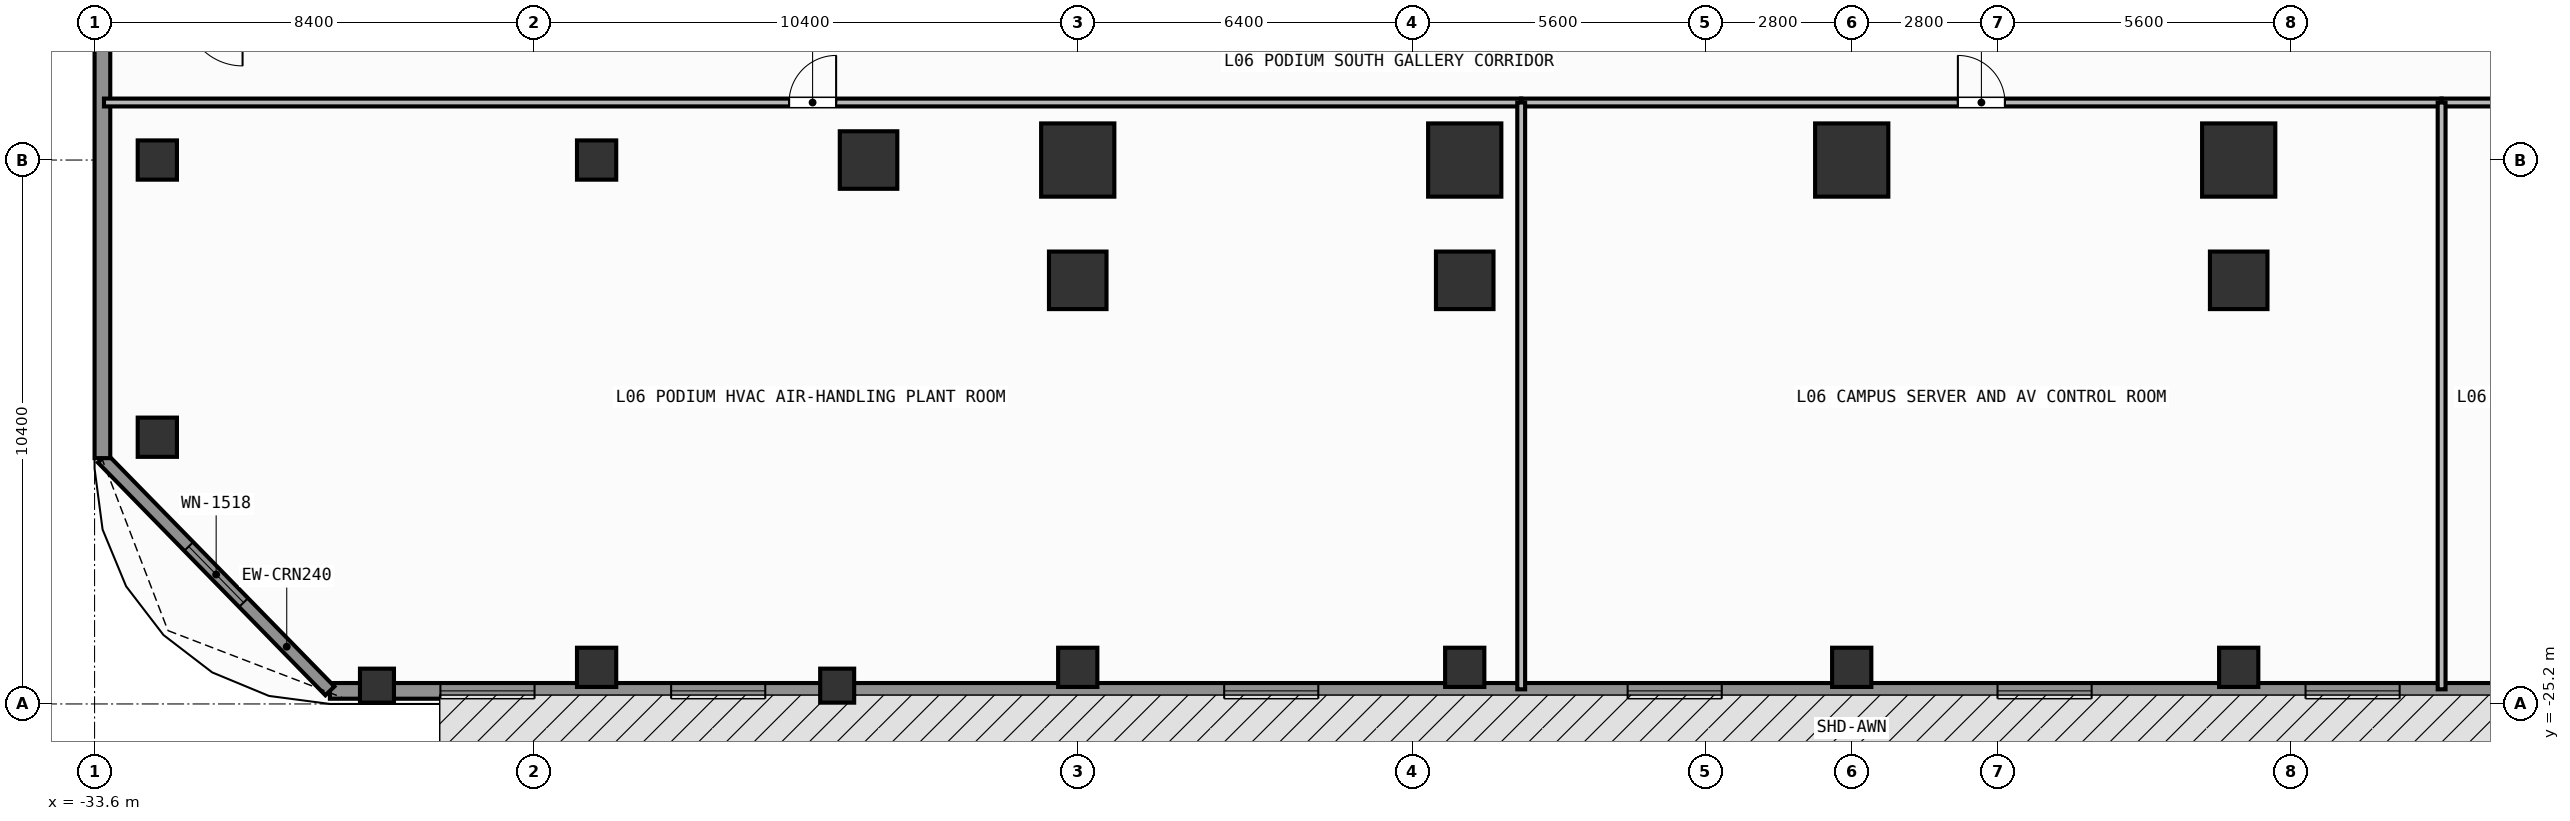
"""IFC4 building model, lengths in metres.
Left out: names, types, materials, properties, quantities, classifications, styles, units other than length and angle.
Written with IfcOpenShell. Run it as: python <this file> out.ifc"""

import sys

from ifc_helpers import new_model, si_unit, direction, frame, frame_2d, origin, origin_2d, place, context, subcontext, project, spatial, rectangle, extrude, element, fill, save


model = new_model("IFC4")
c1 = context("Model", 3, precision=1e-05, world=origin(), true_north=direction((0.0, 1.0)))
c2 = subcontext(c1, "Body", "Model", "MODEL_VIEW")
j1 = project(units=[si_unit("LENGTHUNIT", "METRE"), si_unit("PLANEANGLEUNIT", "RADIAN")], contexts=[c1])
p1 = place(None, origin())
s1 = spatial("IfcSite", under=j1, at=p1, CompositionType="ELEMENT")
p2 = place(p1, origin())
s2 = spatial("IfcBuilding", under=s1, at=p2, CompositionType="ELEMENT")
p3 = place(p2, frame((0.0, 0.0, 21.6)))
s3 = spatial("IfcBuildingStorey", under=s2, at=p3, CompositionType="ELEMENT", Elevation=21.6)
for number, where, z_axis, x_axis in (
    (1, (-14.8, -14.8, 0.0), (0.0, 0.0, 1.0), (1.0, 0.0, 0.0)),
    (2, (-7.4, -14.8, 0.0), (0.0, 0.0, 1.0), (1.0, 0.0, 0.0)),
    (3, (0.0, -14.8, 0.0), (0.0, 0.0, 1.0), (1.0, 0.0, 0.0)),
    (4, (7.4, -14.8, 0.0), (0.0, 0.0, 1.0), (1.0, 0.0, 0.0)),
):
    element("IfcColumn", number, at=place(p3, frame(where, z_axis=z_axis, x_axis=x_axis)), inside=s3, PredefinedType="COLUMN", context=c2, shape_type="SweptSolid", body=[
        extrude(rectangle(XDim=1.4, YDim=1.4, at=origin_2d()), origin(), (0.0, 0.0, 1.0), 4.8),
    ])
for number, where, z_axis, x_axis in (
    (5, (-18.8, -14.8, 0.0), (0.0, 0.0, 1.0), (1.0, 0.0, 0.0)),
    (6, (-14.8, -17.1, 0.0), (0.0, 0.0, 1.0), (1.0, 0.0, 0.0)),
    (7, (-7.4, -17.1, 0.0), (0.0, 0.0, 1.0), (1.0, 0.0, 0.0)),
    (8, (7.4, -17.1, 0.0), (0.0, 0.0, 1.0), (1.0, 0.0, 0.0)),
):
    element("IfcColumn", number, at=place(p3, frame(where, z_axis=z_axis, x_axis=x_axis)), inside=s3, PredefinedType="COLUMN", context=c2, shape_type="SweptSolid", body=[
        extrude(rectangle(XDim=1.1, YDim=1.1, at=origin_2d()), origin(), (0.0, 0.0, 1.0), 4.8),
    ])
for number, where, z_axis, x_axis in (
    (9, (-32.4, -14.8, 0.0), (0.0, 0.0, 1.0), (1.0, 0.0, 0.0)),
    (10, (-24.0, -24.5, 0.0), (0.0, 0.0, 1.0), (1.0, 0.0, 0.0)),
    (11, (-24.0, -14.8, 0.0), (0.0, 0.0, 1.0), (1.0, 0.0, 0.0)),
    (12, (-14.8, -24.5, 0.0), (0.0, 0.0, 1.0), (1.0, 0.0, 0.0)),
    (13, (-7.4, -24.5, 0.0), (0.0, 0.0, 1.0), (1.0, 0.0, 0.0)),
    (14, (0.0, -24.5, 0.0), (0.0, 0.0, 1.0), (1.0, 0.0, 0.0)),
    (15, (7.4, -24.5, 0.0), (0.0, 0.0, 1.0), (1.0, 0.0, 0.0)),
    (16, (-32.4, -20.1, 0.0), (0.0, 0.0, 1.0), (1.0, 0.0, 0.0)),
):
    element("IfcColumn", number, at=place(p3, frame(where, z_axis=z_axis, x_axis=x_axis)), inside=s3, PredefinedType="COLUMN", context=c2, shape_type="SweptSolid", body=[
        extrude(rectangle(XDim=0.75, YDim=0.75, at=origin_2d()), origin(), (0.0, 0.0, 1.0), 4.8),
    ])
for number, where, z_axis, x_axis in (
    (17, (-28.2, -24.85, 0.0), (0.0, 0.0, 1.0), (1.0, 0.0, 0.0)),
    (18, (-19.4, -24.85, 0.0), (0.0, 0.0, 1.0), (1.0, 0.0, 0.0)),
):
    element("IfcColumn", number, at=place(p3, frame(where, z_axis=z_axis, x_axis=x_axis)), inside=s3, PredefinedType="PILASTER", context=c2, shape_type="SweptSolid", body=[
        extrude(rectangle(XDim=0.65, YDim=0.65, at=origin_2d()), origin(), (0.0, 0.0, 1.0), 4.8),
    ])
p4 = place(p3, frame((29.1, -24.95, 0.0), z_axis=(0.0, 0.0, 1.0), x_axis=(-1.0, 0.0, 0.0)))
e19 = element("IfcWall", 19, at=p4, inside=s3, PredefinedType="SOLIDWALL", context=c2, shape_type="SweptSolid", body=[
    extrude(rectangle(XDim=58.2, YDim=0.3, at=frame_2d((29.1, 0.0))), origin(), (0.0, 0.0, 1.0), 4.48),
])
p5 = place(p4, frame((54.287, 0.0, 0.85)))
e20 = element("IfcOpeningElement", 20, at=p5, cuts=e19, PredefinedType="OPENING", context=c2, shape_type="SweptSolid", body=[
    extrude(rectangle(XDim=1.8, YDim=2.0, at=frame_2d((0.9, 1.0))), frame((0.0, 0.16, 0.0), z_axis=(0.0, -1.0, 0.0), x_axis=(1.0, 0.0, 0.0)), (0.0, 0.0, 1.0), 0.32),
])
p6 = place(p4, frame((49.875, 0.0, 0.85)))
e21 = element("IfcOpeningElement", 21, at=p6, cuts=e19, PredefinedType="OPENING", context=c2, shape_type="SweptSolid", body=[
    extrude(rectangle(XDim=1.8, YDim=2.0, at=frame_2d((0.9, 1.0))), frame((0.0, 0.16, 0.0), z_axis=(0.0, -1.0, 0.0), x_axis=(1.0, 0.0, 0.0)), (0.0, 0.0, 1.0), 0.32),
])
p7 = place(p4, frame((39.3, 0.0, 0.85)))
e22 = element("IfcOpeningElement", 22, at=p7, cuts=e19, PredefinedType="OPENING", context=c2, shape_type="SweptSolid", body=[
    extrude(rectangle(XDim=1.8, YDim=2.0, at=frame_2d((0.9, 1.0))), frame((0.0, 0.16, 0.0), z_axis=(0.0, -1.0, 0.0), x_axis=(1.0, 0.0, 0.0)), (0.0, 0.0, 1.0), 0.32),
])
p8 = place(p4, frame((31.585, 0.0, 0.85)))
e23 = element("IfcOpeningElement", 23, at=p8, cuts=e19, PredefinedType="OPENING", context=c2, shape_type="SweptSolid", body=[
    extrude(rectangle(XDim=1.8, YDim=2.0, at=frame_2d((0.9, 1.0))), frame((0.0, 0.16, 0.0), z_axis=(0.0, -1.0, 0.0), x_axis=(1.0, 0.0, 0.0)), (0.0, 0.0, 1.0), 0.32),
])
p9 = place(p4, frame((24.512, 0.0, 0.85)))
e24 = element("IfcOpeningElement", 24, at=p9, cuts=e19, PredefinedType="OPENING", context=c2, shape_type="SweptSolid", body=[
    extrude(rectangle(XDim=1.8, YDim=2.0, at=frame_2d((0.9, 1.0))), frame((0.0, 0.16, 0.0), z_axis=(0.0, -1.0, 0.0), x_axis=(1.0, 0.0, 0.0)), (0.0, 0.0, 1.0), 0.32),
])
p10 = place(p4, frame((18.622, 0.0, 0.85)))
e25 = element("IfcOpeningElement", 25, at=p10, cuts=e19, PredefinedType="OPENING", context=c2, shape_type="SweptSolid", body=[
    extrude(rectangle(XDim=1.8, YDim=2.0, at=frame_2d((0.9, 1.0))), frame((0.0, 0.16, 0.0), z_axis=(0.0, -1.0, 0.0), x_axis=(1.0, 0.0, 0.0)), (0.0, 0.0, 1.0), 0.32),
])
p11 = place(p4, frame((2.113, 0.0, 0.85)))
e26 = element("IfcOpeningElement", 26, at=p11, cuts=e19, PredefinedType="OPENING", context=c2, shape_type="SweptSolid", body=[
    extrude(rectangle(XDim=1.8, YDim=2.0, at=frame_2d((0.9, 1.0))), frame((0.0, 0.16, 0.0), z_axis=(0.0, -1.0, 0.0), x_axis=(1.0, 0.0, 0.0)), (0.0, 0.0, 1.0), 0.32),
])
p12 = place(p3, frame((-29.1, -24.95, 0.0), z_axis=(0.0, 0.0, 1.0), x_axis=(-0.69901822973, 0.715103848756, 0.0)))
e27 = element("IfcWall", 27, at=p12, inside=s3, PredefinedType="SOLIDWALL", context=c2, shape_type="SweptSolid", body=[
    extrude(rectangle(XDim=6.223, YDim=0.24, at=frame_2d((3.111, 0.0))), origin(), (0.0, 0.0, 1.0), 4.48),
])
p13 = place(p12, frame((2.362, 0.0, 0.85)))
e28 = element("IfcOpeningElement", 28, at=p13, cuts=e27, PredefinedType="OPENING", context=c2, shape_type="SweptSolid", body=[
    extrude(rectangle(XDim=1.5, YDim=1.85, at=frame_2d((0.75, 0.925))), frame((0.0, 0.13, 0.0), z_axis=(0.0, -1.0, 0.0), x_axis=(1.0, 0.0, 0.0)), (0.0, 0.0, 1.0), 0.26),
])
p14 = place(p3, frame((-33.45, -20.5, 0.0), z_axis=(0.0, 0.0, 1.0), x_axis=(0.0, 1.0, 0.0)))
e29 = element("IfcWall", 29, at=p14, inside=s3, PredefinedType="SOLIDWALL", context=c2, shape_type="SweptSolid", body=[
    extrude(rectangle(XDim=14.09, YDim=0.3, at=frame_2d((7.045, 0.0))), origin(), (0.0, 0.0, 1.0), 4.48),
])
p15 = place(p3, frame((-33.42, -13.7, 0.0), z_axis=(0.0, 0.0, 1.0), x_axis=(1.0, 0.0, 0.0)))
e30 = element("IfcWall", 30, at=p15, inside=s3, PredefinedType="PARTITIONING", context=c2, shape_type="SweptSolid", body=[
    extrude(rectangle(XDim=27.1, YDim=0.15, at=frame_2d((13.55, 0.0))), origin(), (0.0, 0.0, 1.0), 4.48),
])
p16 = place(p15, frame((13.1, 0.0, 0.0)))
e31 = element("IfcOpeningElement", 31, at=p16, cuts=e30, PredefinedType="OPENING", context=c2, shape_type="SweptSolid", body=[
    extrude(rectangle(XDim=0.9, YDim=2.1, at=frame_2d((0.45, 1.05))), frame((0.0, 0.085, 0.0), z_axis=(0.0, -1.0, 0.0), x_axis=(1.0, 0.0, 0.0)), (0.0, 0.0, 1.0), 0.17),
])
p17 = place(p3, frame((-6.32, -13.7, 0.0), z_axis=(0.0, 0.0, 1.0), x_axis=(1.0, 0.0, 0.0)))
e32 = element("IfcWall", 32, at=p17, inside=s3, PredefinedType="PARTITIONING", context=c2, shape_type="SweptSolid", body=[
    extrude(rectangle(XDim=17.6, YDim=0.15, at=frame_2d((8.8, 0.0))), origin(), (0.0, 0.0, 1.0), 4.48),
])
p18 = place(p17, frame((8.35, 0.0, 0.0)))
e33 = element("IfcOpeningElement", 33, at=p18, cuts=e32, PredefinedType="OPENING", context=c2, shape_type="SweptSolid", body=[
    extrude(rectangle(XDim=0.9, YDim=2.1, at=frame_2d((0.45, 1.05))), frame((0.0, 0.085, 0.0), z_axis=(0.0, -1.0, 0.0), x_axis=(1.0, 0.0, 0.0)), (0.0, 0.0, 1.0), 0.17),
])
p19 = place(p3, frame((11.28, -13.7, 0.0), z_axis=(0.0, 0.0, 1.0), x_axis=(1.0, 0.0, 0.0)))
e34 = element("IfcWall", 34, at=p19, inside=s3, PredefinedType="PARTITIONING", context=c2, shape_type="SweptSolid", body=[
    extrude(rectangle(XDim=6.37, YDim=0.15, at=frame_2d((3.185, 0.0))), origin(), (0.0, 0.0, 1.0), 4.48),
])
p20 = place(p19, frame((1.774, 0.0, 0.0)))
e35 = element("IfcOpeningElement", 35, at=p20, cuts=e34, PredefinedType="OPENING", context=c2, shape_type="SweptSolid", body=[
    extrude(rectangle(XDim=0.85, YDim=2.1, at=frame_2d((0.425, 1.05))), frame((0.0, 0.085, 0.0), z_axis=(0.0, -1.0, 0.0), x_axis=(1.0, 0.0, 0.0)), (0.0, 0.0, 1.0), 0.17),
])
p21 = place(p3, frame((-6.32, -24.92, 0.0), z_axis=(0.0, 0.0, 1.0), x_axis=(0.0, 1.0, 0.0)))
e36 = element("IfcWall", 36, at=p21, inside=s3, PredefinedType="PARTITIONING", context=c2, shape_type="SweptSolid", body=[
    extrude(rectangle(XDim=11.22, YDim=0.15, at=frame_2d((5.61, 0.0))), origin(), (0.0, 0.0, 1.0), 4.48),
])
p22 = place(p3, frame((11.28, -24.92, 0.0), z_axis=(0.0, 0.0, 1.0), x_axis=(0.0, 1.0, 0.0)))
e37 = element("IfcWall", 37, at=p22, inside=s3, PredefinedType="PARTITIONING", context=c2, shape_type="SweptSolid", body=[
    extrude(rectangle(XDim=11.22, YDim=0.15, at=frame_2d((5.61, 0.0))), origin(), (0.0, 0.0, 1.0), 4.17),
])
p23 = place(p13, origin())
e38 = element("IfcWindow", 38, at=p23, inside=s3, PartitioningType="SINGLE_PANEL", PredefinedType="WINDOW", context=c2, shape_type="SweptSolid", body=[
    extrude(rectangle(XDim=1.5, YDim=1.85, at=frame_2d((0.75, 0.925))), frame((0.0, 0.03, 0.0), z_axis=(0.0, -1.0, 0.0), x_axis=(1.0, 0.0, 0.0)), (0.0, 0.0, 1.0), 0.06),
])
fill(e28, e38)
p24 = place(p5, origin())
e39 = element("IfcWindow", 39, at=p24, inside=s3, PartitioningType="SINGLE_PANEL", PredefinedType="WINDOW", context=c2, shape_type="SweptSolid", body=[
    extrude(rectangle(XDim=1.8, YDim=2.0, at=frame_2d((0.9, 1.0))), frame((0.0, 0.03, 0.0), z_axis=(0.0, -1.0, 0.0), x_axis=(1.0, 0.0, 0.0)), (0.0, 0.0, 1.0), 0.06),
])
fill(e20, e39)
p25 = place(p6, origin())
e40 = element("IfcWindow", 40, at=p25, inside=s3, PartitioningType="SINGLE_PANEL", PredefinedType="WINDOW", context=c2, shape_type="SweptSolid", body=[
    extrude(rectangle(XDim=1.8, YDim=2.0, at=frame_2d((0.9, 1.0))), frame((0.0, 0.03, 0.0), z_axis=(0.0, -1.0, 0.0), x_axis=(1.0, 0.0, 0.0)), (0.0, 0.0, 1.0), 0.06),
])
fill(e21, e40)
p26 = place(p7, origin())
e41 = element("IfcWindow", 41, at=p26, inside=s3, PartitioningType="SINGLE_PANEL", PredefinedType="WINDOW", context=c2, shape_type="SweptSolid", body=[
    extrude(rectangle(XDim=1.8, YDim=2.0, at=frame_2d((0.9, 1.0))), frame((0.0, 0.03, 0.0), z_axis=(0.0, -1.0, 0.0), x_axis=(1.0, 0.0, 0.0)), (0.0, 0.0, 1.0), 0.06),
])
fill(e22, e41)
p27 = place(p8, origin())
e42 = element("IfcWindow", 42, at=p27, inside=s3, PartitioningType="SINGLE_PANEL", PredefinedType="WINDOW", context=c2, shape_type="SweptSolid", body=[
    extrude(rectangle(XDim=1.8, YDim=2.0, at=frame_2d((0.9, 1.0))), frame((0.0, 0.03, 0.0), z_axis=(0.0, -1.0, 0.0), x_axis=(1.0, 0.0, 0.0)), (0.0, 0.0, 1.0), 0.06),
])
fill(e23, e42)
p28 = place(p9, origin())
e43 = element("IfcWindow", 43, at=p28, inside=s3, PartitioningType="SINGLE_PANEL", PredefinedType="WINDOW", context=c2, shape_type="SweptSolid", body=[
    extrude(rectangle(XDim=1.8, YDim=2.0, at=frame_2d((0.9, 1.0))), frame((0.0, 0.03, 0.0), z_axis=(0.0, -1.0, 0.0), x_axis=(1.0, 0.0, 0.0)), (0.0, 0.0, 1.0), 0.06),
])
fill(e24, e43)
p29 = place(p10, origin())
e44 = element("IfcWindow", 44, at=p29, inside=s3, PartitioningType="SINGLE_PANEL", PredefinedType="WINDOW", context=c2, shape_type="SweptSolid", body=[
    extrude(rectangle(XDim=1.8, YDim=2.0, at=frame_2d((0.9, 1.0))), frame((0.0, 0.03, 0.0), z_axis=(0.0, -1.0, 0.0), x_axis=(1.0, 0.0, 0.0)), (0.0, 0.0, 1.0), 0.06),
])
fill(e25, e44)
p30 = place(p16, origin())
e45 = element("IfcDoor", 45, at=p30, inside=s3, OperationType="SINGLE_SWING_RIGHT", PredefinedType="DOOR", context=c2, shape_type="SweptSolid", body=[
    extrude(rectangle(XDim=0.9, YDim=2.1, at=frame_2d((0.45, 1.05))), frame((0.0, 0.025, 0.0), z_axis=(0.0, -1.0, 0.0), x_axis=(1.0, 0.0, 0.0)), (0.0, 0.0, 1.0), 0.05),
])
fill(e31, e45)
p31 = place(p18, origin())
e46 = element("IfcDoor", 46, at=p31, inside=s3, OperationType="SINGLE_SWING_LEFT", PredefinedType="DOOR", context=c2, shape_type="SweptSolid", body=[
    extrude(rectangle(XDim=0.9, YDim=2.1, at=frame_2d((0.45, 1.05))), frame((0.0, 0.025, 0.0), z_axis=(0.0, -1.0, 0.0), x_axis=(1.0, 0.0, 0.0)), (0.0, 0.0, 1.0), 0.05),
])
fill(e33, e46)
save(model, sys.argv[1])
